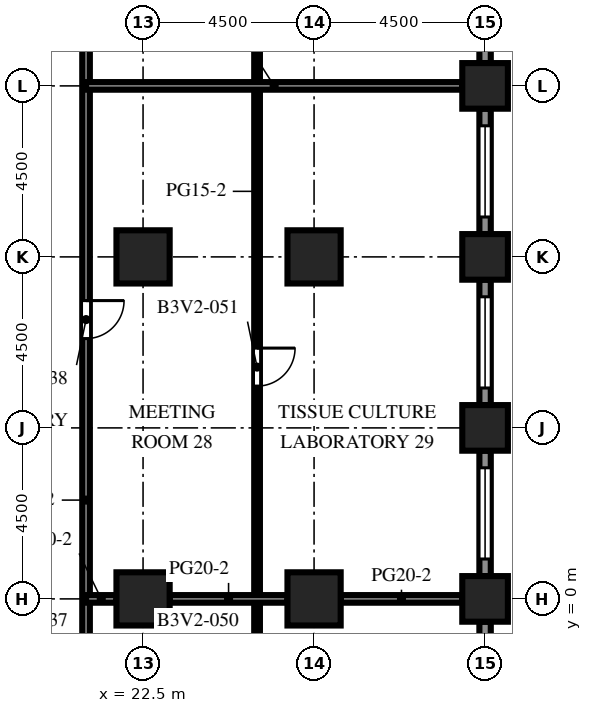
"""IFC4 building model, lengths in metres.
Left out: names, types, materials, properties, quantities, classifications, styles, units other than length and angle.
Written with IfcOpenShell. Run it as: python <this file> out.ifc"""

import sys

from ifc_helpers import new_model, si_unit, direction, frame, frame_2d, origin, origin_2d, place, context, subcontext, project, spatial, rectangle, extrude, element, fill, save


model = new_model("IFC4")
c1 = context("Model", 3, precision=1e-05, world=origin(), true_north=direction((0.0, 1.0)))
c2 = subcontext(c1, "Body", "Model", "MODEL_VIEW")
j1 = project(units=[si_unit("LENGTHUNIT", "METRE"), si_unit("PLANEANGLEUNIT", "RADIAN")], contexts=[c1])
p1 = place(None, origin())
s1 = spatial("IfcSite", under=j1, at=p1, CompositionType="ELEMENT")
p2 = place(p1, origin())
s2 = spatial("IfcBuilding", under=s1, at=p2, CompositionType="ELEMENT")
p3 = place(p2, frame((0.0, 0.0, 106.6)))
s3 = spatial("IfcBuildingStorey", under=s2, at=p3, CompositionType="ELEMENT", Elevation=106.6)
for number, where, z_axis, x_axis in (
    (1, (31.5, 0.0, 0.0), (0.0, 0.0, 1.0), (1.0, 0.0, 0.0)),
    (2, (31.5, 4.5, 0.0), (0.0, 0.0, 1.0), (1.0, 0.0, 0.0)),
    (3, (31.5, 9.0, 0.0), (0.0, 0.0, 1.0), (1.0, 0.0, 0.0)),
    (4, (31.5, 13.5, 0.0), (0.0, 0.0, 1.0), (1.0, 0.0, 0.0)),
):
    element("IfcColumn", number, at=place(p3, frame(where, z_axis=z_axis, x_axis=x_axis)), inside=s3, PredefinedType="COLUMN", context=c2, shape_type="SweptSolid", body=[
        extrude(rectangle(XDim=1.2, YDim=1.2, at=origin_2d()), origin(), (0.0, 0.0, 1.0), 4.1),
    ])
for number, where, z_axis, x_axis in (
    (5, (22.5, 0.0, 0.0), (0.0, 0.0, 1.0), (1.0, 0.0, 0.0)),
    (6, (22.5, 9.0, 0.0), (0.0, 0.0, 1.0), (1.0, 0.0, 0.0)),
    (7, (27.0, 0.0, 0.0), (0.0, 0.0, 1.0), (1.0, 0.0, 0.0)),
    (8, (27.0, 9.0, 0.0), (0.0, 0.0, 1.0), (1.0, 0.0, 0.0)),
):
    element("IfcColumn", number, at=place(p3, frame(where, z_axis=z_axis, x_axis=x_axis)), inside=s3, PredefinedType="COLUMN", context=c2, shape_type="SweptSolid", body=[
        extrude(rectangle(XDim=1.4, YDim=1.4, at=origin_2d()), origin(), (0.0, 0.0, 1.0), 4.1),
    ])
p4 = place(p3, frame((31.5, -0.6, 0.0), z_axis=(0.0, 0.0, 1.0), x_axis=(0.0, -1.0, 0.0)))
e9 = element("IfcWall", 9, at=p4, inside=s3, PredefinedType="SOLIDWALL", context=c2, shape_type="SweptSolid", body=[
    extrude(rectangle(XDim=3.3, YDim=0.3, at=frame_2d((1.65, 0.0))), origin(), (0.0, 0.0, 1.0), 2.6),
])
p5 = place(p4, frame((0.45, 0.0, 0.8)))
e10 = element("IfcOpeningElement", 10, at=p5, cuts=e9, PredefinedType="OPENING", context=c2, shape_type="SweptSolid", body=[
    extrude(rectangle(XDim=2.4, YDim=1.7, at=frame_2d((1.2, 0.85))), frame((0.0, 0.16, 0.0), z_axis=(0.0, -1.0, 0.0), x_axis=(1.0, 0.0, 0.0)), (0.0, 0.0, 1.0), 0.32),
])
p6 = place(p3, frame((31.5, 3.9, 0.0), z_axis=(0.0, 0.0, 1.0), x_axis=(0.0, -1.0, 0.0)))
e11 = element("IfcWall", 11, at=p6, inside=s3, PredefinedType="SOLIDWALL", context=c2, shape_type="SweptSolid", body=[
    extrude(rectangle(XDim=3.3, YDim=0.3, at=frame_2d((1.65, 0.0))), origin(), (0.0, 0.0, 1.0), 2.6),
])
p7 = place(p6, frame((0.45, 0.0, 0.8)))
e12 = element("IfcOpeningElement", 12, at=p7, cuts=e11, PredefinedType="OPENING", context=c2, shape_type="SweptSolid", body=[
    extrude(rectangle(XDim=2.4, YDim=1.7, at=frame_2d((1.2, 0.85))), frame((0.0, 0.16, 0.0), z_axis=(0.0, -1.0, 0.0), x_axis=(1.0, 0.0, 0.0)), (0.0, 0.0, 1.0), 0.32),
])
p8 = place(p3, frame((31.5, 8.4, 0.0), z_axis=(0.0, 0.0, 1.0), x_axis=(0.0, -1.0, 0.0)))
e13 = element("IfcWall", 13, at=p8, inside=s3, PredefinedType="SOLIDWALL", context=c2, shape_type="SweptSolid", body=[
    extrude(rectangle(XDim=3.3, YDim=0.3, at=frame_2d((1.65, 0.0))), origin(), (0.0, 0.0, 1.0), 2.6),
])
p9 = place(p8, frame((0.45, 0.0, 0.8)))
e14 = element("IfcOpeningElement", 14, at=p9, cuts=e13, PredefinedType="OPENING", context=c2, shape_type="SweptSolid", body=[
    extrude(rectangle(XDim=2.4, YDim=1.7, at=frame_2d((1.2, 0.85))), frame((0.0, 0.16, 0.0), z_axis=(0.0, -1.0, 0.0), x_axis=(1.0, 0.0, 0.0)), (0.0, 0.0, 1.0), 0.32),
])
p10 = place(p3, frame((31.5, 12.9, 0.0), z_axis=(0.0, 0.0, 1.0), x_axis=(0.0, -1.0, 0.0)))
e15 = element("IfcWall", 15, at=p10, inside=s3, PredefinedType="SOLIDWALL", context=c2, shape_type="SweptSolid", body=[
    extrude(rectangle(XDim=3.3, YDim=0.3, at=frame_2d((1.65, 0.0))), origin(), (0.0, 0.0, 1.0), 2.6),
])
p11 = place(p10, frame((0.45, 0.0, 0.8)))
e16 = element("IfcOpeningElement", 16, at=p11, cuts=e15, PredefinedType="OPENING", context=c2, shape_type="SweptSolid", body=[
    extrude(rectangle(XDim=2.4, YDim=1.7, at=frame_2d((1.2, 0.85))), frame((0.0, 0.16, 0.0), z_axis=(0.0, -1.0, 0.0), x_axis=(1.0, 0.0, 0.0)), (0.0, 0.0, 1.0), 0.32),
])
p12 = place(p3, frame((31.5, 17.4, 0.0), z_axis=(0.0, 0.0, 1.0), x_axis=(0.0, -1.0, 0.0)))
e17 = element("IfcWall", 17, at=p12, inside=s3, PredefinedType="SOLIDWALL", context=c2, shape_type="SweptSolid", body=[
    extrude(rectangle(XDim=3.3, YDim=0.3, at=frame_2d((1.65, 0.0))), origin(), (0.0, 0.0, 1.0), 2.6),
])
p13 = place(p12, frame((0.45, 0.0, 0.8)))
e18 = element("IfcOpeningElement", 18, at=p13, cuts=e17, PredefinedType="OPENING", context=c2, shape_type="SweptSolid", body=[
    extrude(rectangle(XDim=2.4, YDim=1.7, at=frame_2d((1.2, 0.85))), frame((0.0, 0.16, 0.0), z_axis=(0.0, -1.0, 0.0), x_axis=(1.0, 0.0, 0.0)), (0.0, 0.0, 1.0), 0.32),
])
p14 = place(p3, frame((21.0, 31.35, 0.0), z_axis=(0.0, 0.0, 1.0), x_axis=(0.0, -1.0, 0.0)))
e19 = element("IfcWall", 19, at=p14, inside=s3, PredefinedType="PARTITIONING", context=c2, shape_type="SweptSolid", body=[
    extrude(rectangle(XDim=53.7, YDim=0.2, at=frame_2d((26.85, 0.0))), origin(), (0.0, 0.0, 1.0), 3.5),
])
p15 = place(p14, frame((50.5, 0.0, 0.0)))
e20 = element("IfcOpeningElement", 20, at=p15, cuts=e19, PredefinedType="OPENING", context=c2, shape_type="SweptSolid", body=[
    extrude(rectangle(XDim=1.0, YDim=2.1, at=frame_2d((0.5, 1.05))), frame((0.0, 0.11, 0.0), z_axis=(0.0, -1.0, 0.0), x_axis=(1.0, 0.0, 0.0)), (0.0, 0.0, 1.0), 0.22),
])
p16 = place(p14, frame((46.5, 0.0, 0.0)))
e21 = element("IfcOpeningElement", 21, at=p16, cuts=e19, PredefinedType="OPENING", context=c2, shape_type="SweptSolid", body=[
    extrude(rectangle(XDim=1.0, YDim=2.1, at=frame_2d((0.5, 1.05))), frame((0.0, 0.11, 0.0), z_axis=(0.0, -1.0, 0.0), x_axis=(1.0, 0.0, 0.0)), (0.0, 0.0, 1.0), 0.22),
])
p17 = place(p14, frame((38.5, 0.0, 0.0)))
e22 = element("IfcOpeningElement", 22, at=p17, cuts=e19, PredefinedType="OPENING", context=c2, shape_type="SweptSolid", body=[
    extrude(rectangle(XDim=1.0, YDim=2.1, at=frame_2d((0.5, 1.05))), frame((0.0, 0.11, 0.0), z_axis=(0.0, -1.0, 0.0), x_axis=(1.0, 0.0, 0.0)), (0.0, 0.0, 1.0), 0.22),
])
p18 = place(p14, frame((33.0, 0.0, 0.0)))
e23 = element("IfcOpeningElement", 23, at=p18, cuts=e19, PredefinedType="OPENING", context=c2, shape_type="SweptSolid", body=[
    extrude(rectangle(XDim=1.0, YDim=2.1, at=frame_2d((0.5, 1.05))), frame((0.0, 0.11, 0.0), z_axis=(0.0, -1.0, 0.0), x_axis=(1.0, 0.0, 0.0)), (0.0, 0.0, 1.0), 0.22),
])
p19 = place(p14, frame((23.5, 0.0, 0.0)))
e24 = element("IfcOpeningElement", 24, at=p19, cuts=e19, PredefinedType="OPENING", context=c2, shape_type="SweptSolid", body=[
    extrude(rectangle(XDim=1.0, YDim=2.1, at=frame_2d((0.5, 1.05))), frame((0.0, 0.11, 0.0), z_axis=(0.0, -1.0, 0.0), x_axis=(1.0, 0.0, 0.0)), (0.0, 0.0, 1.0), 0.22),
])
p20 = place(p14, frame((15.75, 0.0, 0.0)))
e25 = element("IfcOpeningElement", 25, at=p20, cuts=e19, PredefinedType="OPENING", context=c2, shape_type="SweptSolid", body=[
    extrude(rectangle(XDim=1.0, YDim=2.1, at=frame_2d((0.5, 1.05))), frame((0.0, 0.11, 0.0), z_axis=(0.0, -1.0, 0.0), x_axis=(1.0, 0.0, 0.0)), (0.0, 0.0, 1.0), 0.22),
])
p21 = place(p14, frame((7.0, 0.0, 0.0)))
e26 = element("IfcOpeningElement", 26, at=p21, cuts=e19, PredefinedType="OPENING", context=c2, shape_type="SweptSolid", body=[
    extrude(rectangle(XDim=1.0, YDim=2.1, at=frame_2d((0.5, 1.05))), frame((0.0, 0.11, 0.0), z_axis=(0.0, -1.0, 0.0), x_axis=(1.0, 0.0, 0.0)), (0.0, 0.0, 1.0), 0.22),
])
p22 = place(p14, frame((1.0, 0.0, 0.0)))
e27 = element("IfcOpeningElement", 27, at=p22, cuts=e19, PredefinedType="OPENING", context=c2, shape_type="SweptSolid", body=[
    extrude(rectangle(XDim=1.0, YDim=2.1, at=frame_2d((0.5, 1.05))), frame((0.0, 0.11, 0.0), z_axis=(0.0, -1.0, 0.0), x_axis=(1.0, 0.0, 0.0)), (0.0, 0.0, 1.0), 0.22),
])
p23 = place(p3, frame((25.5, 31.35, 0.0), z_axis=(0.0, 0.0, 1.0), x_axis=(0.0, -1.0, 0.0)))
e28 = element("IfcWall", 28, at=p23, inside=s3, PredefinedType="PARTITIONING", context=c2, shape_type="SweptSolid", body=[
    extrude(rectangle(XDim=53.7, YDim=0.15, at=frame_2d((26.85, 0.0))), origin(), (0.0, 0.0, 1.0), 3.5),
])
p24 = place(p23, frame((50.5, 0.0, 0.0)))
e29 = element("IfcOpeningElement", 29, at=p24, cuts=e28, PredefinedType="OPENING", context=c2, shape_type="SweptSolid", body=[
    extrude(rectangle(XDim=1.0, YDim=2.1, at=frame_2d((0.5, 1.05))), frame((0.0, 0.085, 0.0), z_axis=(0.0, -1.0, 0.0), x_axis=(1.0, 0.0, 0.0)), (0.0, 0.0, 1.0), 0.17),
])
p25 = place(p23, frame((46.25, 0.0, 0.0)))
e30 = element("IfcOpeningElement", 30, at=p25, cuts=e28, PredefinedType="OPENING", context=c2, shape_type="SweptSolid", body=[
    extrude(rectangle(XDim=1.0, YDim=2.1, at=frame_2d((0.5, 1.05))), frame((0.0, 0.085, 0.0), z_axis=(0.0, -1.0, 0.0), x_axis=(1.0, 0.0, 0.0)), (0.0, 0.0, 1.0), 0.17),
])
p26 = place(p23, frame((38.5, 0.0, 0.0)))
e31 = element("IfcOpeningElement", 31, at=p26, cuts=e28, PredefinedType="OPENING", context=c2, shape_type="SweptSolid", body=[
    extrude(rectangle(XDim=1.0, YDim=2.1, at=frame_2d((0.5, 1.05))), frame((0.0, 0.085, 0.0), z_axis=(0.0, -1.0, 0.0), x_axis=(1.0, 0.0, 0.0)), (0.0, 0.0, 1.0), 0.17),
])
p27 = place(p23, frame((33.0, 0.0, 0.0)))
e32 = element("IfcOpeningElement", 32, at=p27, cuts=e28, PredefinedType="OPENING", context=c2, shape_type="SweptSolid", body=[
    extrude(rectangle(XDim=1.0, YDim=2.1, at=frame_2d((0.5, 1.05))), frame((0.0, 0.085, 0.0), z_axis=(0.0, -1.0, 0.0), x_axis=(1.0, 0.0, 0.0)), (0.0, 0.0, 1.0), 0.17),
])
p28 = place(p23, frame((24.75, 0.0, 0.0)))
e33 = element("IfcOpeningElement", 33, at=p28, cuts=e28, PredefinedType="OPENING", context=c2, shape_type="SweptSolid", body=[
    extrude(rectangle(XDim=1.0, YDim=2.1, at=frame_2d((0.5, 1.05))), frame((0.0, 0.085, 0.0), z_axis=(0.0, -1.0, 0.0), x_axis=(1.0, 0.0, 0.0)), (0.0, 0.0, 1.0), 0.17),
])
p29 = place(p23, frame((15.5, 0.0, 0.0)))
e34 = element("IfcOpeningElement", 34, at=p29, cuts=e28, PredefinedType="OPENING", context=c2, shape_type="SweptSolid", body=[
    extrude(rectangle(XDim=1.0, YDim=2.1, at=frame_2d((0.5, 1.05))), frame((0.0, 0.085, 0.0), z_axis=(0.0, -1.0, 0.0), x_axis=(1.0, 0.0, 0.0)), (0.0, 0.0, 1.0), 0.17),
])
p30 = place(p23, frame((9.75, 0.0, 0.0)))
e35 = element("IfcOpeningElement", 35, at=p30, cuts=e28, PredefinedType="OPENING", context=c2, shape_type="SweptSolid", body=[
    extrude(rectangle(XDim=1.0, YDim=2.1, at=frame_2d((0.5, 1.05))), frame((0.0, 0.085, 0.0), z_axis=(0.0, -1.0, 0.0), x_axis=(1.0, 0.0, 0.0)), (0.0, 0.0, 1.0), 0.17),
])
p31 = place(p23, frame((1.5, 0.0, 0.0)))
e36 = element("IfcOpeningElement", 36, at=p31, cuts=e28, PredefinedType="OPENING", context=c2, shape_type="SweptSolid", body=[
    extrude(rectangle(XDim=1.0, YDim=2.1, at=frame_2d((0.5, 1.05))), frame((0.0, 0.085, 0.0), z_axis=(0.0, -1.0, 0.0), x_axis=(1.0, 0.0, 0.0)), (0.0, 0.0, 1.0), 0.17),
])
p32 = place(p3, frame((21.0, 0.0, 0.0), z_axis=(0.0, 0.0, 1.0), x_axis=(1.0, 0.0, 0.0)))
e37 = element("IfcWall", 37, at=p32, inside=s3, PredefinedType="PARTITIONING", context=c2, shape_type="SweptSolid", body=[
    extrude(rectangle(XDim=0.8, YDim=0.2, at=frame_2d((0.4, 0.0))), origin(), (0.0, 0.0, 1.0), 3.5),
])
p33 = place(p3, frame((23.2, 0.0, 0.0), z_axis=(0.0, 0.0, 1.0), x_axis=(1.0, 0.0, 0.0)))
e38 = element("IfcWall", 38, at=p33, inside=s3, PredefinedType="PARTITIONING", context=c2, shape_type="SweptSolid", body=[
    extrude(rectangle(XDim=3.1, YDim=0.2, at=frame_2d((1.55, 0.0))), origin(), (0.0, 0.0, 1.0), 3.5),
])
p34 = place(p3, frame((27.7, 0.0, 0.0), z_axis=(0.0, 0.0, 1.0), x_axis=(1.0, 0.0, 0.0)))
e39 = element("IfcWall", 39, at=p34, inside=s3, PredefinedType="PARTITIONING", context=c2, shape_type="SweptSolid", body=[
    extrude(rectangle(XDim=3.2, YDim=0.2, at=frame_2d((1.6, 0.0))), origin(), (0.0, 0.0, 1.0), 3.5),
])
p35 = place(p3, frame((21.0, 13.5, 0.0), z_axis=(0.0, 0.0, 1.0), x_axis=(1.0, 0.0, 0.0)))
e40 = element("IfcWall", 40, at=p35, inside=s3, PredefinedType="PARTITIONING", context=c2, shape_type="SweptSolid", body=[
    extrude(rectangle(XDim=9.9, YDim=0.2, at=frame_2d((4.95, 0.0))), origin(), (0.0, 0.0, 1.0), 3.5),
])
p36 = place(p7, origin())
e41 = element("IfcWindow", 41, at=p36, inside=s3, PartitioningType="SINGLE_PANEL", PredefinedType="WINDOW", context=c2, shape_type="SweptSolid", body=[
    extrude(rectangle(XDim=2.4, YDim=1.7, at=frame_2d((1.2, 0.85))), frame((0.0, 0.03, 0.0), z_axis=(0.0, -1.0, 0.0), x_axis=(1.0, 0.0, 0.0)), (0.0, 0.0, 1.0), 0.06),
])
fill(e12, e41)
p37 = place(p9, origin())
e42 = element("IfcWindow", 42, at=p37, inside=s3, PartitioningType="SINGLE_PANEL", PredefinedType="WINDOW", context=c2, shape_type="SweptSolid", body=[
    extrude(rectangle(XDim=2.4, YDim=1.7, at=frame_2d((1.2, 0.85))), frame((0.0, 0.03, 0.0), z_axis=(0.0, -1.0, 0.0), x_axis=(1.0, 0.0, 0.0)), (0.0, 0.0, 1.0), 0.06),
])
fill(e14, e42)
p38 = place(p11, origin())
e43 = element("IfcWindow", 43, at=p38, inside=s3, PartitioningType="SINGLE_PANEL", PredefinedType="WINDOW", context=c2, shape_type="SweptSolid", body=[
    extrude(rectangle(XDim=2.4, YDim=1.7, at=frame_2d((1.2, 0.85))), frame((0.0, 0.03, 0.0), z_axis=(0.0, -1.0, 0.0), x_axis=(1.0, 0.0, 0.0)), (0.0, 0.0, 1.0), 0.06),
])
fill(e16, e43)
p39 = place(p19, origin())
e44 = element("IfcDoor", 44, at=p39, inside=s3, OperationType="SINGLE_SWING_LEFT", PredefinedType="DOOR", context=c2, shape_type="SweptSolid", body=[
    extrude(rectangle(XDim=1.0, YDim=2.1, at=frame_2d((0.5, 1.05))), frame((0.0, 0.025, 0.0), z_axis=(0.0, -1.0, 0.0), x_axis=(1.0, 0.0, 0.0)), (0.0, 0.0, 1.0), 0.05),
])
fill(e24, e44)
p40 = place(p28, origin())
e45 = element("IfcDoor", 45, at=p40, inside=s3, OperationType="SINGLE_SWING_LEFT", PredefinedType="DOOR", context=c2, shape_type="SweptSolid", body=[
    extrude(rectangle(XDim=1.0, YDim=2.1, at=frame_2d((0.5, 1.05))), frame((0.0, 0.025, 0.0), z_axis=(0.0, -1.0, 0.0), x_axis=(1.0, 0.0, 0.0)), (0.0, 0.0, 1.0), 0.05),
])
fill(e33, e45)
save(model, sys.argv[1])
